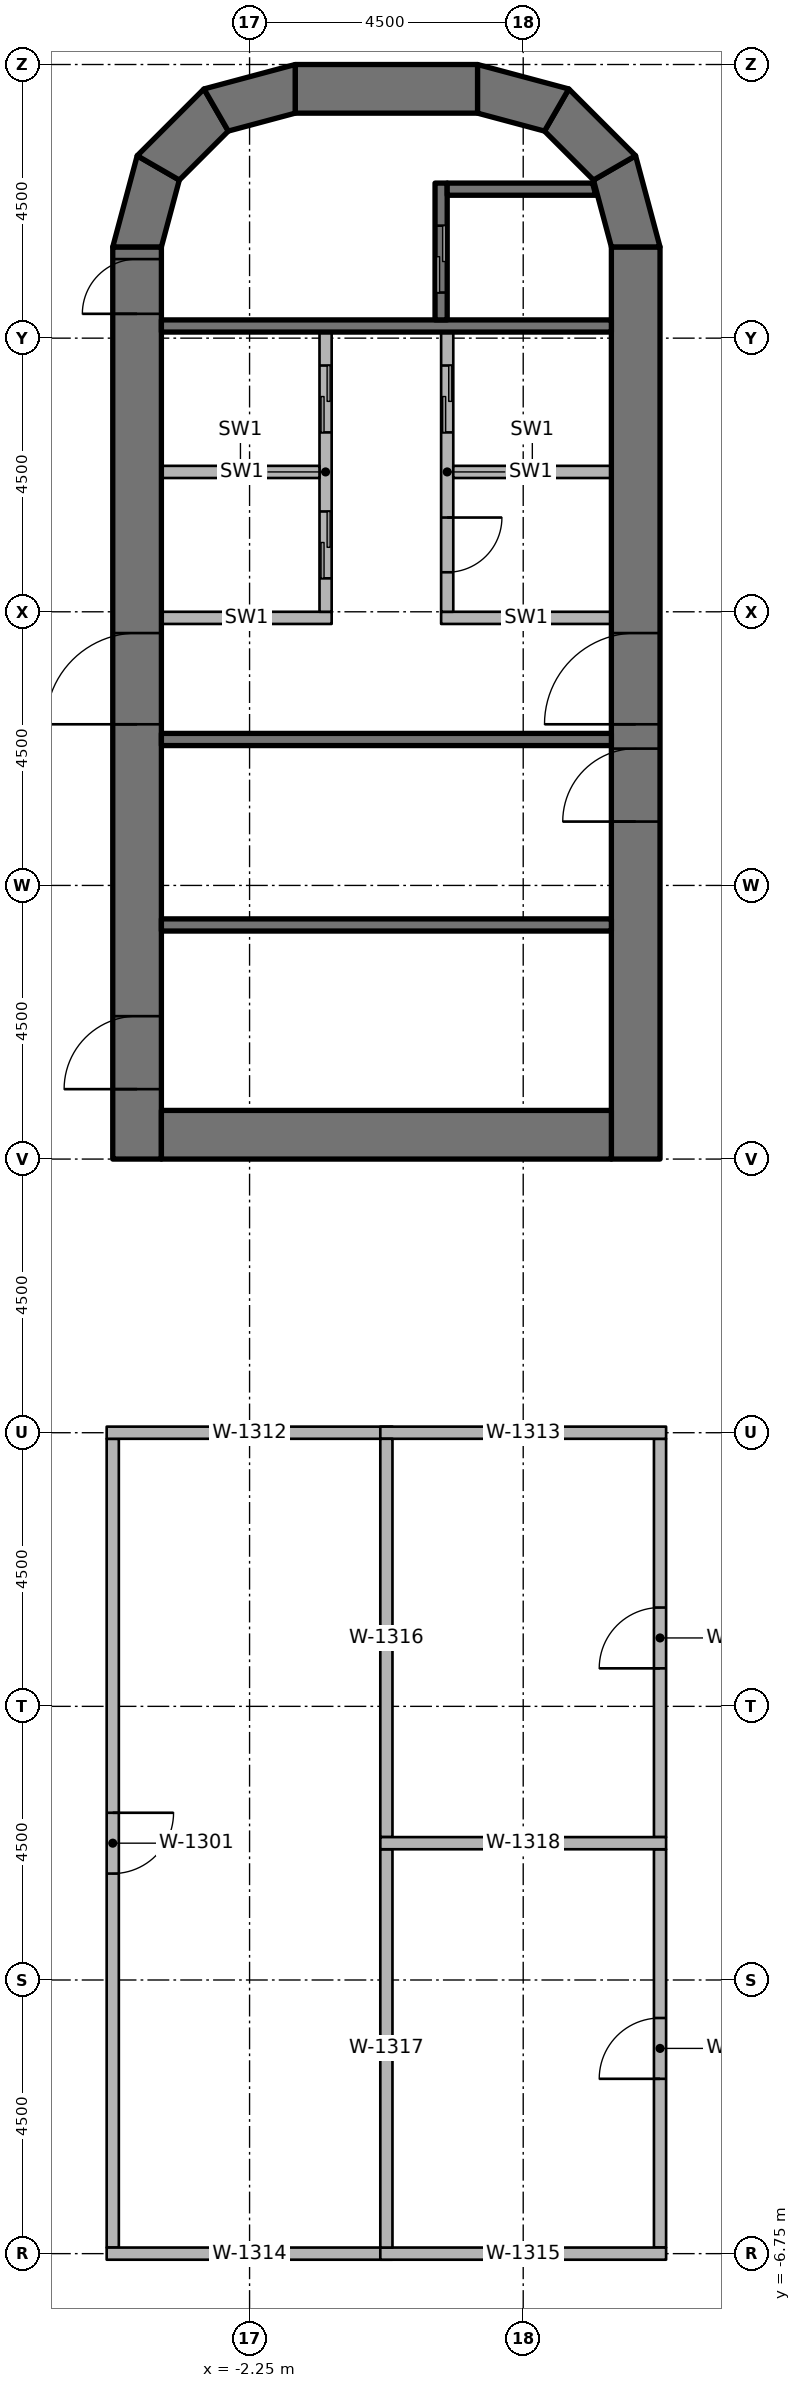
"""IFC4 building model, lengths in metres.
Left out: names, types, materials, properties, quantities, classifications, styles, units other than length and angle.
Written with IfcOpenShell. Run it as: python <this file> out.ifc"""

import sys

from ifc_helpers import new_model, si_unit, direction, frame, frame_2d, origin, place, context, subcontext, project, spatial, polyline, rectangle, outline, extrude, element, fill, save


model = new_model("IFC4")
c1 = context("Model", 3, precision=1e-05, world=origin(), true_north=direction((0.0, 1.0)))
c2 = subcontext(c1, "Body", "Model", "MODEL_VIEW")
j1 = project(units=[si_unit("LENGTHUNIT", "METRE"), si_unit("PLANEANGLEUNIT", "RADIAN")], contexts=[c1])
p1 = place(None, origin())
s1 = spatial("IfcSite", under=j1, at=p1, CompositionType="ELEMENT")
p2 = place(p1, origin())
s2 = spatial("IfcBuilding", under=s1, at=p2, CompositionType="ELEMENT")
p3 = place(p2, frame((0.0, 0.0, 132.2)))
s3 = spatial("IfcBuildingStorey", under=s2, at=p3, CompositionType="ELEMENT", Elevation=132.2)
p4 = place(p3, frame((-4.1, 11.25, 0.0), z_axis=(0.0, 0.0, 1.0), x_axis=(0.0, 1.0, 0.0)))
e1 = element("IfcWall", 1, at=p4, inside=s3, PredefinedType="SHEAR", context=c2, shape_type="SweptSolid", body=[
    extrude(rectangle(XDim=15.0, YDim=0.8, at=frame_2d((7.5, 0.0))), origin(), (0.0, 0.0, 1.0), 3.8),
])
p5 = place(p4, frame((7.15, 0.0, 0.0)))
e2 = element("IfcOpeningElement", 2, at=p5, cuts=e1, PredefinedType="OPENING", context=c2, shape_type="SweptSolid", body=[
    extrude(rectangle(XDim=1.5, YDim=2.3, at=frame_2d((0.75, 1.15))), frame((0.0, 0.41, 0.0), z_axis=(0.0, -1.0, 0.0), x_axis=(1.0, 0.0, 0.0)), (0.0, 0.0, 1.0), 0.82),
])
p6 = place(p4, frame((13.9, 0.0, 0.0)))
e3 = element("IfcOpeningElement", 3, at=p6, cuts=e1, PredefinedType="OPENING", context=c2, shape_type="SweptSolid", body=[
    extrude(rectangle(XDim=0.9, YDim=2.1, at=frame_2d((0.45, 1.05))), frame((0.0, 0.41, 0.0), z_axis=(0.0, -1.0, 0.0), x_axis=(1.0, 0.0, 0.0)), (0.0, 0.0, 1.0), 0.82),
])
p7 = place(p4, frame((1.15, 0.0, 0.0)))
e4 = element("IfcOpeningElement", 4, at=p7, cuts=e1, PredefinedType="OPENING", context=c2, shape_type="SweptSolid", body=[
    extrude(rectangle(XDim=1.2, YDim=2.1, at=frame_2d((0.6, 1.05))), frame((0.0, 0.41, 0.0), z_axis=(0.0, -1.0, 0.0), x_axis=(1.0, 0.0, 0.0)), (0.0, 0.0, 1.0), 0.82),
])
p8 = place(p3, frame((4.1, 11.25, 0.0), z_axis=(0.0, 0.0, 1.0), x_axis=(0.0, 1.0, 0.0)))
e5 = element("IfcWall", 5, at=p8, inside=s3, PredefinedType="SHEAR", context=c2, shape_type="SweptSolid", body=[
    extrude(rectangle(XDim=15.0, YDim=0.8, at=frame_2d((7.5, 0.0))), origin(), (0.0, 0.0, 1.0), 3.8),
])
p9 = place(p8, frame((7.15, 0.0, 0.0)))
e6 = element("IfcOpeningElement", 6, at=p9, cuts=e5, PredefinedType="OPENING", context=c2, shape_type="SweptSolid", body=[
    extrude(rectangle(XDim=1.5, YDim=2.3, at=frame_2d((0.75, 1.15))), frame((0.0, 0.41, 0.0), z_axis=(0.0, -1.0, 0.0), x_axis=(1.0, 0.0, 0.0)), (0.0, 0.0, 1.0), 0.82),
])
p10 = place(p8, frame((5.55, 0.0, 0.0)))
e7 = element("IfcOpeningElement", 7, at=p10, cuts=e5, PredefinedType="OPENING", context=c2, shape_type="SweptSolid", body=[
    extrude(rectangle(XDim=1.2, YDim=2.1, at=frame_2d((0.6, 1.05))), frame((0.0, 0.41, 0.0), z_axis=(0.0, -1.0, 0.0), x_axis=(1.0, 0.0, 0.0)), (0.0, 0.0, 1.0), 0.82),
])
p11 = place(p3, frame((-3.7, 11.65, 0.0), z_axis=(0.0, 0.0, 1.0), x_axis=(1.0, 0.0, 0.0)))
e8 = element("IfcWall", 8, at=p11, inside=s3, PredefinedType="SHEAR", context=c2, shape_type="SweptSolid", body=[
    extrude(rectangle(XDim=7.4, YDim=0.8, at=frame_2d((3.7, 0.0))), origin(), (0.0, 0.0, 1.0), 3.8),
])
p12 = place(p3, frame((-1.5, 28.85, 0.0), z_axis=(0.0, 0.0, 1.0), x_axis=(1.0, 0.0, 0.0)))
e9 = element("IfcWall", 9, at=p12, inside=s3, PredefinedType="SHEAR", context=c2, shape_type="SweptSolid", body=[
    extrude(rectangle(XDim=3.0, YDim=0.8, at=frame_2d((1.5, 0.0))), origin(), (0.0, 0.0, 1.0), 3.8),
])
p13 = place(p3, origin())
e10 = element("IfcWall", 10, at=p13, inside=s3, PredefinedType="SHEAR", context=c2, shape_type="SweptSolid", body=[
    extrude(outline(polyline([(-4.5, 26.25), (-4.098, 27.75), (-3.405, 27.35), (-3.7, 26.25), (-4.5, 26.25)])), origin(), (0.0, 0.0, 1.0), 3.8),
])
p14 = place(p3, origin())
e11 = element("IfcWall", 11, at=p14, inside=s3, PredefinedType="SHEAR", context=c2, shape_type="SweptSolid", body=[
    extrude(outline(polyline([(-4.098, 27.75), (-3.0, 28.848), (-2.6, 28.155), (-3.405, 27.35), (-4.098, 27.75)])), origin(), (0.0, 0.0, 1.0), 3.8),
])
p15 = place(p3, origin())
e12 = element("IfcWall", 12, at=p15, inside=s3, PredefinedType="SHEAR", context=c2, shape_type="SweptSolid", body=[
    extrude(outline(polyline([(-3.0, 28.848), (-1.5, 29.25), (-1.5, 28.45), (-2.6, 28.155), (-3.0, 28.848)])), origin(), (0.0, 0.0, 1.0), 3.8),
])
p16 = place(p3, origin())
e13 = element("IfcWall", 13, at=p16, inside=s3, PredefinedType="SHEAR", context=c2, shape_type="SweptSolid", body=[
    extrude(outline(polyline([(4.5, 26.25), (4.098, 27.75), (3.405, 27.35), (3.7, 26.25), (4.5, 26.25)])), origin(), (0.0, 0.0, 1.0), 3.8),
])
p17 = place(p3, origin())
e14 = element("IfcWall", 14, at=p17, inside=s3, PredefinedType="SHEAR", context=c2, shape_type="SweptSolid", body=[
    extrude(outline(polyline([(4.098, 27.75), (3.0, 28.848), (2.6, 28.155), (3.405, 27.35), (4.098, 27.75)])), origin(), (0.0, 0.0, 1.0), 3.8),
])
p18 = place(p3, origin())
e15 = element("IfcWall", 15, at=p18, inside=s3, PredefinedType="SHEAR", context=c2, shape_type="SweptSolid", body=[
    extrude(outline(polyline([(3.0, 28.848), (1.5, 29.25), (1.5, 28.45), (2.6, 28.155), (3.0, 28.848)])), origin(), (0.0, 0.0, 1.0), 3.8),
])
p19 = place(p3, frame((-3.7, 24.95, 0.0), z_axis=(0.0, 0.0, 1.0), x_axis=(1.0, 0.0, 0.0)))
e16 = element("IfcWall", 16, at=p19, inside=s3, PredefinedType="SHEAR", context=c2, shape_type="SweptSolid", body=[
    extrude(rectangle(XDim=7.4, YDim=0.2, at=frame_2d((3.7, 0.0))), origin(), (0.0, 0.0, 1.0), 3.65),
])
p20 = place(p3, frame((0.9, 27.3, 0.0), z_axis=(0.0, 0.0, 1.0), x_axis=(0.0, -1.0, 0.0)))
e17 = element("IfcWall", 17, at=p20, inside=s3, PredefinedType="SHEAR", context=c2, shape_type="SweptSolid", body=[
    extrude(rectangle(XDim=2.25, YDim=0.2, at=frame_2d((1.125, 0.0))), origin(), (0.0, 0.0, 1.0), 3.65),
])
p21 = place(p20, frame((0.7, 0.0, 0.0)))
e18 = element("IfcOpeningElement", 18, at=p21, cuts=e17, PredefinedType="OPENING", context=c2, shape_type="SweptSolid", body=[
    extrude(rectangle(XDim=1.1, YDim=2.3, at=frame_2d((0.55, 1.15))), frame((0.0, 0.11, 0.0), z_axis=(0.0, -1.0, 0.0), x_axis=(1.0, 0.0, 0.0)), (0.0, 0.0, 1.0), 0.22),
])
p22 = place(p3, origin())
e19 = element("IfcWall", 19, at=p22, inside=s3, PredefinedType="SHEAR", context=c2, shape_type="SweptSolid", body=[
    extrude(outline(polyline([(1.0, 27.1), (3.444, 27.1), (3.39, 27.3), (1.0, 27.3), (1.0, 27.1)])), origin(), (0.0, 0.0, 1.0), 3.65),
])
for number, where, z_axis, x_axis in (
    (20, (-3.7, 18.15, 0.0), (0.0, 0.0, 1.0), (1.0, 0.0, 0.0)),
    (21, (-3.7, 15.1, 0.0), (0.0, 0.0, 1.0), (1.0, 0.0, 0.0)),
):
    element("IfcWall", number, at=place(p3, frame(where, z_axis=z_axis, x_axis=x_axis)), inside=s3, PredefinedType="SHEAR", context=c2, shape_type="SweptSolid", body=[
        extrude(rectangle(XDim=7.4, YDim=0.2, at=frame_2d((3.7, 0.0))), origin(), (0.0, 0.0, 1.0), 3.65),
    ])
p23 = place(p3, frame((-3.7, 20.15, 0.0), z_axis=(0.0, 0.0, 1.0), x_axis=(1.0, 0.0, 0.0)))
e22 = element("IfcWall", 22, at=p23, inside=s3, PredefinedType="PARTITIONING", context=c2, shape_type="SweptSolid", body=[
    extrude(rectangle(XDim=2.8, YDim=0.2, at=frame_2d((1.4, 0.0))), origin(), (0.0, 0.0, 1.0), 3.65),
])
p24 = place(p3, frame((-1.0, 24.85, 0.0), z_axis=(0.0, 0.0, 1.0), x_axis=(0.0, -1.0, 0.0)))
e23 = element("IfcWall", 23, at=p24, inside=s3, PredefinedType="PARTITIONING", context=c2, shape_type="SweptSolid", body=[
    extrude(rectangle(XDim=4.6, YDim=0.2, at=frame_2d((2.3, 0.0))), origin(), (0.0, 0.0, 1.0), 3.65),
])
p25 = place(p24, frame((0.55, 0.0, 0.0)))
e24 = element("IfcOpeningElement", 24, at=p25, cuts=e23, PredefinedType="OPENING", context=c2, shape_type="SweptSolid", body=[
    extrude(rectangle(XDim=1.1, YDim=2.3, at=frame_2d((0.55, 1.15))), frame((0.0, 0.11, 0.0), z_axis=(0.0, -1.0, 0.0), x_axis=(1.0, 0.0, 0.0)), (0.0, 0.0, 1.0), 0.22),
])
p26 = place(p24, frame((2.95, 0.0, 0.0)))
e25 = element("IfcOpeningElement", 25, at=p26, cuts=e23, PredefinedType="OPENING", context=c2, shape_type="SweptSolid", body=[
    extrude(rectangle(XDim=1.1, YDim=2.3, at=frame_2d((0.55, 1.15))), frame((0.0, 0.11, 0.0), z_axis=(0.0, -1.0, 0.0), x_axis=(1.0, 0.0, 0.0)), (0.0, 0.0, 1.0), 0.22),
])
p27 = place(p3, frame((0.9, 20.15, 0.0), z_axis=(0.0, 0.0, 1.0), x_axis=(1.0, 0.0, 0.0)))
e26 = element("IfcWall", 26, at=p27, inside=s3, PredefinedType="PARTITIONING", context=c2, shape_type="SweptSolid", body=[
    extrude(rectangle(XDim=2.8, YDim=0.2, at=frame_2d((1.4, 0.0))), origin(), (0.0, 0.0, 1.0), 3.65),
])
p28 = place(p3, frame((1.0, 24.85, 0.0), z_axis=(0.0, 0.0, 1.0), x_axis=(0.0, -1.0, 0.0)))
e27 = element("IfcWall", 27, at=p28, inside=s3, PredefinedType="PARTITIONING", context=c2, shape_type="SweptSolid", body=[
    extrude(rectangle(XDim=4.6, YDim=0.2, at=frame_2d((2.3, 0.0))), origin(), (0.0, 0.0, 1.0), 3.65),
])
p29 = place(p28, frame((0.55, 0.0, 0.0)))
e28 = element("IfcOpeningElement", 28, at=p29, cuts=e27, PredefinedType="OPENING", context=c2, shape_type="SweptSolid", body=[
    extrude(rectangle(XDim=1.1, YDim=2.3, at=frame_2d((0.55, 1.15))), frame((0.0, 0.11, 0.0), z_axis=(0.0, -1.0, 0.0), x_axis=(1.0, 0.0, 0.0)), (0.0, 0.0, 1.0), 0.22),
])
p30 = place(p28, frame((3.05, 0.0, 0.0)))
e29 = element("IfcOpeningElement", 29, at=p30, cuts=e27, PredefinedType="OPENING", context=c2, shape_type="SweptSolid", body=[
    extrude(rectangle(XDim=0.9, YDim=2.1, at=frame_2d((0.45, 1.05))), frame((0.0, 0.11, 0.0), z_axis=(0.0, -1.0, 0.0), x_axis=(1.0, 0.0, 0.0)), (0.0, 0.0, 1.0), 0.22),
])
for number, where, z_axis, x_axis in (
    (30, (-3.7, 22.55, 0.0), (0.0, 0.0, 1.0), (1.0, 0.0, 0.0)),
    (31, (1.1, 22.55, 0.0), (0.0, 0.0, 1.0), (1.0, 0.0, 0.0)),
):
    element("IfcWall", number, at=place(p3, frame(where, z_axis=z_axis, x_axis=x_axis)), inside=s3, PredefinedType="PARTITIONING", context=c2, shape_type="SweptSolid", body=[
        extrude(rectangle(XDim=2.6, YDim=0.2, at=frame_2d((1.3, 0.0))), origin(), (0.0, 0.0, 1.0), 3.65),
    ])
p31 = place(p3, frame((-4.5, 6.65, 0.0), z_axis=(0.0, 0.0, 1.0), x_axis=(0.0, -1.0, 0.0)))
e32 = element("IfcWall", 32, at=p31, inside=s3, PredefinedType="PARTITIONING", context=c2, shape_type="SweptSolid", body=[
    extrude(rectangle(XDim=13.3, YDim=0.2, at=frame_2d((6.65, 0.0))), origin(), (0.0, 0.0, 1.0), 2.738),
])
p32 = place(p31, frame((6.15, 0.0, 0.0)))
e33 = element("IfcOpeningElement", 33, at=p32, cuts=e32, PredefinedType="OPENING", context=c2, shape_type="SweptSolid", body=[
    extrude(rectangle(XDim=1.0, YDim=2.1, at=frame_2d((0.5, 1.05))), frame((0.0, 0.11, 0.0), z_axis=(0.0, -1.0, 0.0), x_axis=(1.0, 0.0, 0.0)), (0.0, 0.0, 1.0), 0.22),
])
p33 = place(p3, frame((4.5, 0.1, 0.0), z_axis=(0.0, 0.0, 1.0), x_axis=(0.0, 1.0, 0.0)))
e34 = element("IfcWall", 34, at=p33, inside=s3, PredefinedType="PARTITIONING", context=c2, shape_type="SweptSolid", body=[
    extrude(rectangle(XDim=6.55, YDim=0.2, at=frame_2d((3.275, 0.0))), origin(), (0.0, 0.0, 1.0), 2.738),
])
p34 = place(p33, frame((2.775, 0.0, 0.0)))
e35 = element("IfcOpeningElement", 35, at=p34, cuts=e34, PredefinedType="OPENING", context=c2, shape_type="SweptSolid", body=[
    extrude(rectangle(XDim=1.0, YDim=2.1, at=frame_2d((0.5, 1.05))), frame((0.0, 0.11, 0.0), z_axis=(0.0, -1.0, 0.0), x_axis=(1.0, 0.0, 0.0)), (0.0, 0.0, 1.0), 0.22),
])
p35 = place(p3, frame((4.5, -6.65, 0.0), z_axis=(0.0, 0.0, 1.0), x_axis=(0.0, 1.0, 0.0)))
e36 = element("IfcWall", 36, at=p35, inside=s3, PredefinedType="PARTITIONING", context=c2, shape_type="SweptSolid", body=[
    extrude(rectangle(XDim=6.55, YDim=0.2, at=frame_2d((3.275, 0.0))), origin(), (0.0, 0.0, 1.0), 2.738),
])
p36 = place(p35, frame((2.775, 0.0, 0.0)))
e37 = element("IfcOpeningElement", 37, at=p36, cuts=e36, PredefinedType="OPENING", context=c2, shape_type="SweptSolid", body=[
    extrude(rectangle(XDim=1.0, YDim=2.1, at=frame_2d((0.5, 1.05))), frame((0.0, 0.11, 0.0), z_axis=(0.0, -1.0, 0.0), x_axis=(1.0, 0.0, 0.0)), (0.0, 0.0, 1.0), 0.22),
])
for number, where, z_axis, x_axis in (
    (38, (-4.6, 6.75, 0.0), (0.0, 0.0, 1.0), (1.0, 0.0, 0.0)),
    (39, (-0.1, 6.75, 0.0), (0.0, 0.0, 1.0), (1.0, 0.0, 0.0)),
    (40, (-4.6, -6.75, 0.0), (0.0, 0.0, 1.0), (1.0, 0.0, 0.0)),
    (41, (-0.1, -6.75, 0.0), (0.0, 0.0, 1.0), (1.0, 0.0, 0.0)),
):
    element("IfcWall", number, at=place(p3, frame(where, z_axis=z_axis, x_axis=x_axis)), inside=s3, PredefinedType="PARTITIONING", context=c2, shape_type="SweptSolid", body=[
        extrude(rectangle(XDim=4.7, YDim=0.2, at=frame_2d((2.35, 0.0))), origin(), (0.0, 0.0, 1.0), 2.738),
    ])
for number, where, z_axis, x_axis in (
    (42, (0.0, 0.1, 0.0), (0.0, 0.0, 1.0), (0.0, 1.0, 0.0)),
    (43, (0.0, -6.65, 0.0), (0.0, 0.0, 1.0), (0.0, 1.0, 0.0)),
):
    element("IfcWall", number, at=place(p3, frame(where, z_axis=z_axis, x_axis=x_axis)), inside=s3, PredefinedType="PARTITIONING", context=c2, shape_type="SweptSolid", body=[
        extrude(rectangle(XDim=6.55, YDim=0.2, at=frame_2d((3.275, 0.0))), origin(), (0.0, 0.0, 1.0), 2.738),
    ])
p37 = place(p3, frame((-0.1, 0.0, 0.0), z_axis=(0.0, 0.0, 1.0), x_axis=(1.0, 0.0, 0.0)))
e44 = element("IfcWall", 44, at=p37, inside=s3, PredefinedType="PARTITIONING", context=c2, shape_type="SweptSolid", body=[
    extrude(rectangle(XDim=4.7, YDim=0.2, at=frame_2d((2.35, 0.0))), origin(), (0.0, 0.0, 1.0), 2.738),
])
p38 = place(p5, origin())
e45 = element("IfcDoor", 45, at=p38, inside=s3, OperationType="DOUBLE_DOOR_SINGLE_SWING", PredefinedType="DOOR", context=c2, shape_type="SweptSolid", body=[
    extrude(rectangle(XDim=1.5, YDim=2.3, at=frame_2d((0.75, 1.15))), frame((0.0, 0.025, 0.0), z_axis=(0.0, -1.0, 0.0), x_axis=(1.0, 0.0, 0.0)), (0.0, 0.0, 1.0), 0.05),
])
fill(e2, e45)
p39 = place(p9, origin())
e46 = element("IfcDoor", 46, at=p39, inside=s3, OperationType="DOUBLE_DOOR_SINGLE_SWING", PredefinedType="DOOR", context=c2, shape_type="SweptSolid", body=[
    extrude(rectangle(XDim=1.5, YDim=2.3, at=frame_2d((0.75, 1.15))), frame((0.0, 0.025, 0.0), z_axis=(0.0, -1.0, 0.0), x_axis=(1.0, 0.0, 0.0)), (0.0, 0.0, 1.0), 0.05),
])
fill(e6, e46)
p40 = place(p6, origin())
e47 = element("IfcDoor", 47, at=p40, inside=s3, OperationType="SINGLE_SWING_RIGHT", PredefinedType="DOOR", context=c2, shape_type="SweptSolid", body=[
    extrude(rectangle(XDim=0.9, YDim=2.1, at=frame_2d((0.45, 1.05))), frame((0.0, 0.025, 0.0), z_axis=(0.0, -1.0, 0.0), x_axis=(1.0, 0.0, 0.0)), (0.0, 0.0, 1.0), 0.05),
])
fill(e3, e47)
p41 = place(p10, origin())
e48 = element("IfcDoor", 48, at=p41, inside=s3, OperationType="SINGLE_SWING_LEFT", PredefinedType="DOOR", context=c2, shape_type="SweptSolid", body=[
    extrude(rectangle(XDim=1.2, YDim=2.1, at=frame_2d((0.6, 1.05))), frame((0.0, 0.025, 0.0), z_axis=(0.0, -1.0, 0.0), x_axis=(1.0, 0.0, 0.0)), (0.0, 0.0, 1.0), 0.05),
])
fill(e7, e48)
p42 = place(p7, origin())
e49 = element("IfcDoor", 49, at=p42, inside=s3, OperationType="SINGLE_SWING_RIGHT", PredefinedType="DOOR", context=c2, shape_type="SweptSolid", body=[
    extrude(rectangle(XDim=1.2, YDim=2.1, at=frame_2d((0.6, 1.05))), frame((0.0, 0.025, 0.0), z_axis=(0.0, -1.0, 0.0), x_axis=(1.0, 0.0, 0.0)), (0.0, 0.0, 1.0), 0.05),
])
fill(e4, e49)
p43 = place(p21, origin())
e50 = element("IfcDoor", 50, at=p43, inside=s3, OperationType="DOUBLE_DOOR_SLIDING", PredefinedType="DOOR", context=c2, shape_type="SweptSolid", body=[
    extrude(rectangle(XDim=1.1, YDim=2.3, at=frame_2d((0.55, 1.15))), frame((0.0, 0.025, 0.0), z_axis=(0.0, -1.0, 0.0), x_axis=(1.0, 0.0, 0.0)), (0.0, 0.0, 1.0), 0.05),
])
fill(e18, e50)
p44 = place(p25, origin())
e51 = element("IfcDoor", 51, at=p44, inside=s3, OperationType="DOUBLE_DOOR_SLIDING", PredefinedType="DOOR", context=c2, shape_type="SweptSolid", body=[
    extrude(rectangle(XDim=1.1, YDim=2.3, at=frame_2d((0.55, 1.15))), frame((0.0, 0.025, 0.0), z_axis=(0.0, -1.0, 0.0), x_axis=(1.0, 0.0, 0.0)), (0.0, 0.0, 1.0), 0.05),
])
fill(e24, e51)
p45 = place(p26, origin())
e52 = element("IfcDoor", 52, at=p45, inside=s3, OperationType="DOUBLE_DOOR_SLIDING", PredefinedType="DOOR", context=c2, shape_type="SweptSolid", body=[
    extrude(rectangle(XDim=1.1, YDim=2.3, at=frame_2d((0.55, 1.15))), frame((0.0, 0.025, 0.0), z_axis=(0.0, -1.0, 0.0), x_axis=(1.0, 0.0, 0.0)), (0.0, 0.0, 1.0), 0.05),
])
fill(e25, e52)
p46 = place(p29, origin())
e53 = element("IfcDoor", 53, at=p46, inside=s3, OperationType="DOUBLE_DOOR_SLIDING", PredefinedType="DOOR", context=c2, shape_type="SweptSolid", body=[
    extrude(rectangle(XDim=1.1, YDim=2.3, at=frame_2d((0.55, 1.15))), frame((0.0, 0.025, 0.0), z_axis=(0.0, -1.0, 0.0), x_axis=(1.0, 0.0, 0.0)), (0.0, 0.0, 1.0), 0.05),
])
fill(e28, e53)
p47 = place(p30, origin())
e54 = element("IfcDoor", 54, at=p47, inside=s3, OperationType="SINGLE_SWING_LEFT", PredefinedType="DOOR", context=c2, shape_type="SweptSolid", body=[
    extrude(rectangle(XDim=0.9, YDim=2.1, at=frame_2d((0.45, 1.05))), frame((0.0, 0.025, 0.0), z_axis=(0.0, -1.0, 0.0), x_axis=(1.0, 0.0, 0.0)), (0.0, 0.0, 1.0), 0.05),
])
fill(e29, e54)
p48 = place(p34, origin())
e55 = element("IfcDoor", 55, at=p48, inside=s3, OperationType="SINGLE_SWING_LEFT", PredefinedType="DOOR", context=c2, shape_type="SweptSolid", body=[
    extrude(rectangle(XDim=1.0, YDim=2.1, at=frame_2d((0.5, 1.05))), frame((0.0, 0.025, 0.0), z_axis=(0.0, -1.0, 0.0), x_axis=(1.0, 0.0, 0.0)), (0.0, 0.0, 1.0), 0.05),
])
fill(e35, e55)
p49 = place(p36, origin())
e56 = element("IfcDoor", 56, at=p49, inside=s3, OperationType="SINGLE_SWING_RIGHT", PredefinedType="DOOR", context=c2, shape_type="SweptSolid", body=[
    extrude(rectangle(XDim=1.0, YDim=2.1, at=frame_2d((0.5, 1.05))), frame((0.0, 0.025, 0.0), z_axis=(0.0, -1.0, 0.0), x_axis=(1.0, 0.0, 0.0)), (0.0, 0.0, 1.0), 0.05),
])
fill(e37, e56)
p50 = place(p32, origin())
e57 = element("IfcDoor", 57, at=p50, inside=s3, OperationType="SINGLE_SWING_RIGHT", PredefinedType="DOOR", context=c2, shape_type="SweptSolid", body=[
    extrude(rectangle(XDim=1.0, YDim=2.1, at=frame_2d((0.5, 1.05))), frame((0.0, 0.025, 0.0), z_axis=(0.0, -1.0, 0.0), x_axis=(1.0, 0.0, 0.0)), (0.0, 0.0, 1.0), 0.05),
])
fill(e33, e57)
save(model, sys.argv[1])
